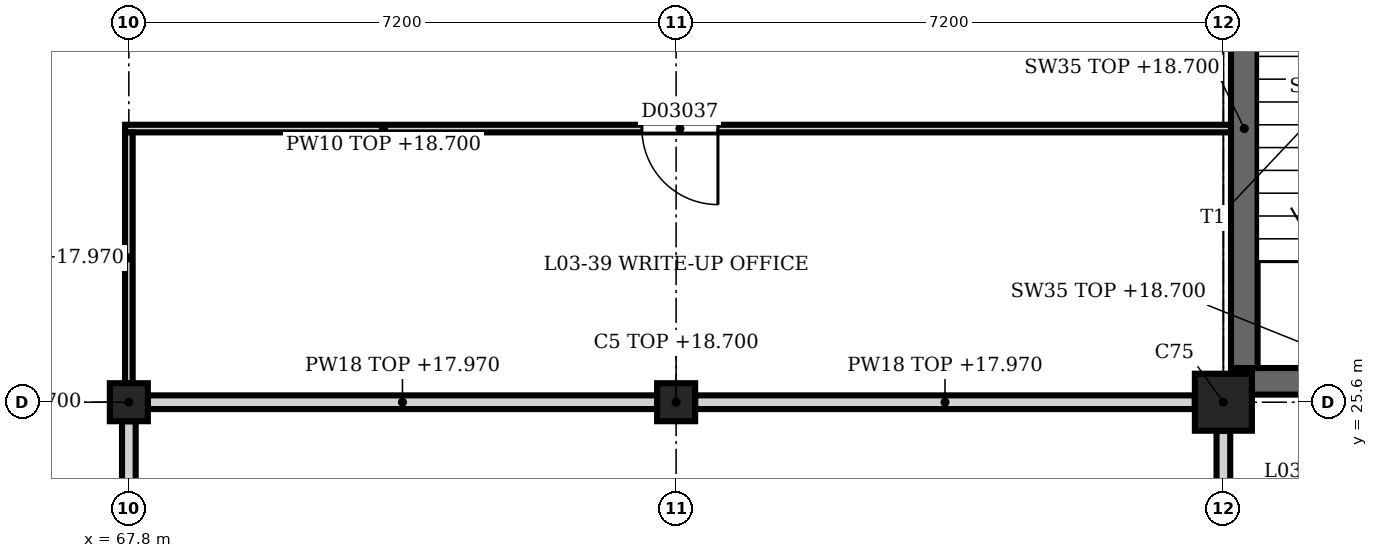
"""IFC4 building model, lengths in metres.
Left out: names, types, materials, properties, quantities, classifications, styles, units other than length and angle.
Written with IfcOpenShell. Run it as: python <this file> out.ifc"""

import sys

from ifc_helpers import new_model, si_unit, direction, frame, frame_2d, origin, origin_2d, place, context, subcontext, project, spatial, rectangle, extrude, element, fill, save


model = new_model("IFC4")
c1 = context("Model", 3, precision=1e-05, world=origin(), true_north=direction((0.0, 1.0)))
c2 = subcontext(c1, "Body", "Model", "MODEL_VIEW")
j1 = project(units=[si_unit("LENGTHUNIT", "METRE"), si_unit("PLANEANGLEUNIT", "RADIAN")], contexts=[c1])
p1 = place(None, origin())
s1 = spatial("IfcSite", under=j1, at=p1, CompositionType="ELEMENT")
p2 = place(p1, origin())
s2 = spatial("IfcBuilding", under=s1, at=p2, CompositionType="ELEMENT")
p3 = place(p2, frame((0.0, 0.0, 14.4)))
s3 = spatial("IfcBuildingStorey", under=s2, at=p3, CompositionType="ELEMENT", Elevation=14.4)
p4 = place(p3, frame((82.2, 25.6, 0.0), z_axis=(0.0, 0.0, 1.0), x_axis=(1.0, 0.0, 0.0)))
e1 = element("IfcColumn", 1, at=p4, inside=s3, PredefinedType="COLUMN", context=c2, shape_type="SweptSolid", body=[
    extrude(rectangle(XDim=0.75, YDim=0.75, at=origin_2d()), origin(), (0.0, 0.0, 1.0), 4.5),
])
for number, where, z_axis, x_axis in (
    (2, (67.8, 25.6, 0.0), (0.0, 0.0, 1.0), (1.0, 0.0, 0.0)),
    (3, (75.0, 25.6, 0.0), (0.0, 0.0, 1.0), (1.0, 0.0, 0.0)),
):
    element("IfcColumn", number, at=place(p3, frame(where, z_axis=z_axis, x_axis=x_axis)), inside=s3, PredefinedType="COLUMN", context=c2, shape_type="SweptSolid", body=[
        extrude(rectangle(XDim=0.5, YDim=0.5, at=origin_2d()), origin(), (0.0, 0.0, 1.0), 4.3),
    ])
p5 = place(p3, frame((82.575, 25.875, 0.0), z_axis=(0.0, 0.0, 1.0), x_axis=(1.0, 0.0, 0.0)))
e4 = element("IfcWall", 4, at=p5, inside=s3, PredefinedType="SHEAR", context=c2, shape_type="SweptSolid", body=[
    extrude(rectangle(XDim=6.45, YDim=0.35, at=frame_2d((3.225, 0.0))), origin(), (0.0, 0.0, 1.0), 4.3),
])
p6 = place(p5, frame((3.825, 0.0, 0.0)))
e5 = element("IfcOpeningElement", 5, at=p6, cuts=e4, PredefinedType="OPENING", context=c2, shape_type="SweptSolid", body=[
    extrude(rectangle(XDim=1.2, YDim=2.1, at=frame_2d((0.6, 1.05))), frame((0.0, 0.185, 0.0), z_axis=(0.0, -1.0, 0.0), x_axis=(1.0, 0.0, 0.0)), (0.0, 0.0, 1.0), 0.37),
])
p7 = place(p3, frame((82.475, 26.05, 0.0), z_axis=(0.0, 0.0, 1.0), x_axis=(0.0, 1.0, 0.0)))
e6 = element("IfcWall", 6, at=p7, inside=s3, PredefinedType="SHEAR", context=c2, shape_type="SweptSolid", body=[
    extrude(rectangle(XDim=6.3, YDim=0.35, at=frame_2d((3.15, 0.0))), origin(), (0.0, 0.0, 1.0), 4.3),
])
p8 = place(p3, frame((68.05, 25.6, 0.0), z_axis=(0.0, 0.0, 1.0), x_axis=(1.0, 0.0, 0.0)))
e7 = element("IfcWall", 7, at=p8, inside=s3, PredefinedType="PARTITIONING", context=c2, shape_type="SweptSolid", body=[
    extrude(rectangle(XDim=6.7, YDim=0.18, at=frame_2d((3.35, 0.0))), origin(), (0.0, 0.0, 1.0), 3.57),
])
p9 = place(p3, frame((75.25, 25.6, 0.0), z_axis=(0.0, 0.0, 1.0), x_axis=(1.0, 0.0, 0.0)))
e8 = element("IfcWall", 8, at=p9, inside=s3, PredefinedType="PARTITIONING", context=c2, shape_type="SweptSolid", body=[
    extrude(rectangle(XDim=6.575, YDim=0.18, at=frame_2d((3.288, 0.0))), origin(), (0.0, 0.0, 1.0), 3.57),
])
p10 = place(p3, frame((82.3, 29.2, 0.0), z_axis=(0.0, 0.0, 1.0), x_axis=(-1.0, 0.0, 0.0)))
e9 = element("IfcWall", 9, at=p10, inside=s3, PredefinedType="PARTITIONING", context=c2, shape_type="SweptSolid", body=[
    extrude(rectangle(XDim=14.55, YDim=0.1, at=frame_2d((7.275, 0.0))), origin(), (0.0, 0.0, 1.0), 4.3),
])
p11 = place(p10, frame((6.75, 0.0, 0.0)))
e10 = element("IfcOpeningElement", 10, at=p11, cuts=e9, PredefinedType="OPENING", context=c2, shape_type="SweptSolid", body=[
    extrude(rectangle(XDim=1.0, YDim=2.1, at=frame_2d((0.5, 1.05))), frame((0.0, 0.06, 0.0), z_axis=(0.0, -1.0, 0.0), x_axis=(1.0, 0.0, 0.0)), (0.0, 0.0, 1.0), 0.12),
])
p12 = place(p3, frame((67.8, 25.35, 0.0), z_axis=(0.0, 0.0, 1.0), x_axis=(0.0, -1.0, 0.0)))
e11 = element("IfcWall", 11, at=p12, inside=s3, PredefinedType="PARTITIONING", context=c2, shape_type="SweptSolid", body=[
    extrude(rectangle(XDim=3.26, YDim=0.18, at=frame_2d((1.63, 0.0))), origin(), (0.0, 0.0, 1.0), 3.57),
])
p13 = place(p12, frame((1.0, 0.0, 0.0)))
e12 = element("IfcOpeningElement", 12, at=p13, cuts=e11, PredefinedType="OPENING", context=c2, shape_type="SweptSolid", body=[
    extrude(rectangle(XDim=1.1, YDim=2.3, at=frame_2d((0.55, 1.15))), frame((0.0, 0.1, 0.0), z_axis=(0.0, -1.0, 0.0), x_axis=(1.0, 0.0, 0.0)), (0.0, 0.0, 1.0), 0.2),
])
p14 = place(p3, frame((67.8, 25.85, 0.0), z_axis=(0.0, 0.0, 1.0), x_axis=(0.0, 1.0, 0.0)))
e13 = element("IfcWall", 13, at=p14, inside=s3, PredefinedType="PARTITIONING", context=c2, shape_type="SweptSolid", body=[
    extrude(rectangle(XDim=3.3, YDim=0.1, at=frame_2d((1.65, 0.0))), origin(), (0.0, 0.0, 1.0), 3.57),
])
p15 = place(p3, frame((82.2, 22.045, 0.0), z_axis=(0.0, 0.0, 1.0), x_axis=(0.0, 1.0, 0.0)))
e14 = element("IfcWall", 14, at=p15, inside=s3, PredefinedType="PARTITIONING", context=c2, shape_type="SweptSolid", body=[
    extrude(rectangle(XDim=3.18, YDim=0.18, at=frame_2d((1.59, 0.0))), origin(), (0.0, 0.0, 1.0), 3.47),
])
p16 = place(p11, origin())
e15 = element("IfcDoor", 15, at=p16, inside=s3, OperationType="SINGLE_SWING_LEFT", PredefinedType="DOOR", context=c2, shape_type="SweptSolid", body=[
    extrude(rectangle(XDim=1.0, YDim=2.1, at=frame_2d((0.5, 1.05))), frame((0.0, 0.025, 0.0), z_axis=(0.0, -1.0, 0.0), x_axis=(1.0, 0.0, 0.0)), (0.0, 0.0, 1.0), 0.05),
])
fill(e10, e15)
save(model, sys.argv[1])
